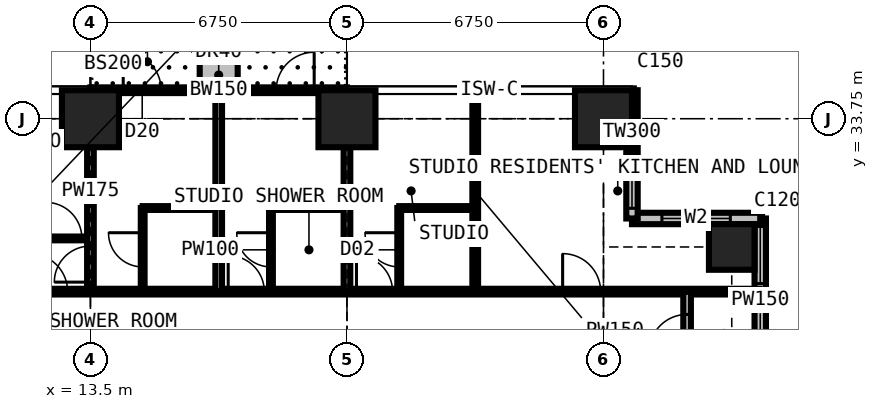
"""IFC4 building model, lengths in metres.
Left out: names, types, materials, properties, quantities, classifications, styles, units other than length and angle.
Written with IfcOpenShell. Run it as: python <this file> out.ifc"""

import sys

from ifc_helpers import new_model, si_unit, direction, frame, frame_2d, origin, origin_2d, place, context, subcontext, project, spatial, rectangle, extrude, element, fill, save


model = new_model("IFC4")
c1 = context("Model", 3, precision=1e-05, world=origin(), true_north=direction((0.0, 1.0)))
c2 = subcontext(c1, "Body", "Model", "MODEL_VIEW")
j1 = project(units=[si_unit("LENGTHUNIT", "METRE"), si_unit("PLANEANGLEUNIT", "RADIAN")], contexts=[c1])
p1 = place(None, origin())
s1 = spatial("IfcSite", under=j1, at=p1, CompositionType="ELEMENT")
p2 = place(p1, origin())
s2 = spatial("IfcBuilding", under=s1, at=p2, CompositionType="ELEMENT")
p3 = place(p2, frame((0.0, 0.0, 156.6)))
s3 = spatial("IfcBuildingStorey", under=s2, at=p3, CompositionType="ELEMENT", Elevation=156.6)
for number, where, z_axis, x_axis in (
    (1, (13.5, 33.75, 0.0), (0.0, 0.0, 1.0), (1.0, 0.0, 0.0)),
    (2, (20.25, 33.75, 0.0), (0.0, 0.0, 1.0), (1.0, 0.0, 0.0)),
    (3, (27.0, 33.75, 0.0), (0.0, 0.0, 1.0), (1.0, 0.0, 0.0)),
):
    element("IfcColumn", number, at=place(p3, frame(where, z_axis=z_axis, x_axis=x_axis)), inside=s3, PredefinedType="COLUMN", context=c2, shape_type="SweptSolid", body=[
        extrude(rectangle(XDim=1.5, YDim=1.5, at=origin_2d()), origin(), (0.0, 0.0, 1.0), 3.6),
    ])
p4 = place(p3, frame((30.375, 30.375, 0.0), z_axis=(0.0, 0.0, 1.0), x_axis=(1.0, 0.0, 0.0)))
e4 = element("IfcColumn", 4, at=p4, inside=s3, PredefinedType="COLUMN", context=c2, shape_type="SweptSolid", body=[
    extrude(rectangle(XDim=1.2, YDim=1.2, at=origin_2d()), origin(), (0.0, 0.0, 1.0), 3.6),
])
p5 = place(p3, frame((31.125, 27.75, 0.0), z_axis=(0.0, 0.0, 1.0), x_axis=(0.0, 1.0, 0.0)))
e5 = element("IfcWall", 5, at=p5, inside=s3, PredefinedType="SOLIDWALL", context=c2, shape_type="SweptSolid", body=[
    extrude(rectangle(XDim=3.375, YDim=0.3, at=frame_2d((1.688, 0.0))), origin(), (0.0, 0.0, 1.0), 3.375),
])
p6 = place(p5, frame((1.663, 0.0, 0.9)))
e6 = element("IfcOpeningElement", 6, at=p6, cuts=e5, PredefinedType="OPENING", context=c2, shape_type="SweptSolid", body=[
    extrude(rectangle(XDim=1.5, YDim=1.8, at=frame_2d((0.75, 0.9))), frame((0.0, 0.16, 0.0), z_axis=(0.0, -1.0, 0.0), x_axis=(1.0, 0.0, 0.0)), (0.0, 0.0, 1.0), 0.32),
])
p7 = place(p3, frame((31.125, 31.125, 0.0), z_axis=(0.0, 0.0, 1.0), x_axis=(-1.0, 0.0, 0.0)))
e7 = element("IfcWall", 7, at=p7, inside=s3, PredefinedType="SOLIDWALL", context=c2, shape_type="SweptSolid", body=[
    extrude(rectangle(XDim=3.375, YDim=0.3, at=frame_2d((1.688, 0.0))), origin(), (0.0, 0.0, 1.0), 3.375),
])
p8 = place(p7, frame((0.788, 0.0, 0.6)))
e8 = element("IfcOpeningElement", 8, at=p8, cuts=e7, PredefinedType="OPENING", context=c2, shape_type="SweptSolid", body=[
    extrude(rectangle(XDim=1.8, YDim=2.1, at=frame_2d((0.9, 1.05))), frame((0.0, 0.16, 0.0), z_axis=(0.0, -1.0, 0.0), x_axis=(1.0, 0.0, 0.0)), (0.0, 0.0, 1.0), 0.32),
])
p9 = place(p3, frame((27.75, 31.125, 0.0), z_axis=(0.0, 0.0, 1.0), x_axis=(0.0, 1.0, 0.0)))
e9 = element("IfcWall", 9, at=p9, inside=s3, PredefinedType="SOLIDWALL", context=c2, shape_type="SweptSolid", body=[
    extrude(rectangle(XDim=3.375, YDim=0.3, at=frame_2d((1.688, 0.0))), origin(), (0.0, 0.0, 1.0), 3.375),
])
p10 = place(p9, frame((0.268, 0.0, 0.9)))
e10 = element("IfcOpeningElement", 10, at=p10, cuts=e9, PredefinedType="OPENING", context=c2, shape_type="SweptSolid", body=[
    extrude(rectangle(XDim=1.5, YDim=1.8, at=frame_2d((0.75, 0.9))), frame((0.0, 0.16, 0.0), z_axis=(0.0, -1.0, 0.0), x_axis=(1.0, 0.0, 0.0)), (0.0, 0.0, 1.0), 0.32),
])
p11 = place(p3, frame((13.5, 34.5, 0.0), z_axis=(0.0, 0.0, 1.0), x_axis=(1.0, 0.0, 0.0)))
e11 = element("IfcWall", 11, at=p11, inside=s3, PredefinedType="SOLIDWALL", context=c2, shape_type="SweptSolid", body=[
    extrude(rectangle(XDim=6.75, YDim=0.15, at=frame_2d((3.375, 0.0))), origin(), (0.0, 0.0, 1.0), 3.375),
])
p12 = place(p11, frame((0.863, 0.0, 0.0)))
e12 = element("IfcOpeningElement", 12, at=p12, cuts=e11, PredefinedType="OPENING", context=c2, shape_type="SweptSolid", body=[
    extrude(rectangle(XDim=1.0, YDim=2.2, at=frame_2d((0.5, 1.1))), frame((0.0, 0.085, 0.0), z_axis=(0.0, -1.0, 0.0), x_axis=(1.0, 0.0, 0.0)), (0.0, 0.0, 1.0), 0.17),
])
p13 = place(p11, frame((1.975, 0.0, 0.9)))
e13 = element("IfcOpeningElement", 13, at=p13, cuts=e11, PredefinedType="OPENING", context=c2, shape_type="SweptSolid", body=[
    extrude(rectangle(XDim=1.2, YDim=1.8, at=frame_2d((0.6, 0.9))), frame((0.0, 0.085, 0.0), z_axis=(0.0, -1.0, 0.0), x_axis=(1.0, 0.0, 0.0)), (0.0, 0.0, 1.0), 0.17),
])
p14 = place(p11, frame((4.887, 0.0, 0.0)))
e14 = element("IfcOpeningElement", 14, at=p14, cuts=e11, PredefinedType="OPENING", context=c2, shape_type="SweptSolid", body=[
    extrude(rectangle(XDim=1.0, YDim=2.2, at=frame_2d((0.5, 1.1))), frame((0.0, 0.085, 0.0), z_axis=(0.0, -1.0, 0.0), x_axis=(1.0, 0.0, 0.0)), (0.0, 0.0, 1.0), 0.17),
])
p15 = place(p11, frame((3.575, 0.0, 0.9)))
e15 = element("IfcOpeningElement", 15, at=p15, cuts=e11, PredefinedType="OPENING", context=c2, shape_type="SweptSolid", body=[
    extrude(rectangle(XDim=1.2, YDim=1.8, at=frame_2d((0.6, 0.9))), frame((0.0, 0.085, 0.0), z_axis=(0.0, -1.0, 0.0), x_axis=(1.0, 0.0, 0.0)), (0.0, 0.0, 1.0), 0.17),
])
p16 = place(p3, frame((16.875, 34.6, 0.0), z_axis=(0.0, 0.0, 1.0), x_axis=(0.0, 1.0, 0.0)))
e16 = element("IfcWall", 16, at=p16, inside=s3, PredefinedType="USERDEFINED", context=c2, shape_type="SweptSolid", body=[
    extrude(rectangle(XDim=2.2, YDim=1.0, at=frame_2d((1.1, 0.0))), origin(), (0.0, 0.0, 1.0), 0.9),
])
p17 = place(p3, frame((10.125, 30.6, 0.0), z_axis=(0.0, 0.0, 1.0), x_axis=(1.0, 0.0, 0.0)))
e17 = element("IfcWall", 17, at=p17, inside=s3, PredefinedType="PARTITIONING", context=c2, shape_type="SweptSolid", body=[
    extrude(rectangle(XDim=3.375, YDim=0.1, at=frame_2d((1.688, 0.0))), origin(), (0.0, 0.0, 1.0), 3.375),
])
p18 = place(p17, frame((2.2, 0.0, 0.0)))
e18 = element("IfcOpeningElement", 18, at=p18, cuts=e17, PredefinedType="OPENING", context=c2, shape_type="SweptSolid", body=[
    extrude(rectangle(XDim=0.95, YDim=2.2, at=frame_2d((0.475, 1.1))), frame((0.0, 0.06, 0.0), z_axis=(0.0, -1.0, 0.0), x_axis=(1.0, 0.0, 0.0)), (0.0, 0.0, 1.0), 0.12),
])
p19 = place(p3, frame((11.3, 29.2, 0.0), z_axis=(0.0, 0.0, 1.0), x_axis=(1.0, 0.0, 0.0)))
e19 = element("IfcWall", 19, at=p19, inside=s3, PredefinedType="PARTITIONING", context=c2, shape_type="SweptSolid", body=[
    extrude(rectangle(XDim=19.809, YDim=0.15, at=frame_2d((9.904, 0.0))), origin(), (0.0, 0.0, 1.0), 3.375),
])
p20 = place(p19, frame((14.625, 0.0, 0.0)))
e20 = element("IfcOpeningElement", 20, at=p20, cuts=e19, PredefinedType="OPENING", context=c2, shape_type="SweptSolid", body=[
    extrude(rectangle(XDim=1.0, YDim=2.2, at=frame_2d((0.5, 1.1))), frame((0.0, 0.085, 0.0), z_axis=(0.0, -1.0, 0.0), x_axis=(1.0, 0.0, 0.0)), (0.0, 0.0, 1.0), 0.17),
])
p21 = place(p19, frame((5.825, 0.0, 0.0)))
e21 = element("IfcOpeningElement", 21, at=p21, cuts=e19, PredefinedType="OPENING", context=c2, shape_type="SweptSolid", body=[
    extrude(rectangle(XDim=0.95, YDim=2.2, at=frame_2d((0.475, 1.1))), frame((0.0, 0.085, 0.0), z_axis=(0.0, -1.0, 0.0), x_axis=(1.0, 0.0, 0.0)), (0.0, 0.0, 1.0), 0.17),
])
p22 = place(p19, frame((9.2, 0.0, 0.0)))
e22 = element("IfcOpeningElement", 22, at=p22, cuts=e19, PredefinedType="OPENING", context=c2, shape_type="SweptSolid", body=[
    extrude(rectangle(XDim=0.95, YDim=2.2, at=frame_2d((0.475, 1.1))), frame((0.0, 0.085, 0.0), z_axis=(0.0, -1.0, 0.0), x_axis=(1.0, 0.0, 0.0)), (0.0, 0.0, 1.0), 0.17),
])
p23 = place(p19, frame((0.6, 0.0, 0.0)))
e23 = element("IfcOpeningElement", 23, at=p23, cuts=e19, PredefinedType="OPENING", context=c2, shape_type="SweptSolid", body=[
    extrude(rectangle(XDim=1.0, YDim=2.2, at=frame_2d((0.5, 1.1))), frame((0.0, 0.085, 0.0), z_axis=(0.0, -1.0, 0.0), x_axis=(1.0, 0.0, 0.0)), (0.0, 0.0, 1.0), 0.17),
])
p24 = place(p3, frame((13.5, 29.2, 0.0), z_axis=(0.0, 0.0, 1.0), x_axis=(0.0, 1.0, 0.0)))
e24 = element("IfcWall", 24, at=p24, inside=s3, PredefinedType="PARTITIONING", context=c2, shape_type="SweptSolid", body=[
    extrude(rectangle(XDim=5.284, YDim=0.175, at=frame_2d((2.642, 0.0))), origin(), (0.0, 0.0, 1.0), 2.806),
])
p25 = place(p24, frame((0.25, 0.0, 0.0)))
e25 = element("IfcOpeningElement", 25, at=p25, cuts=e24, PredefinedType="OPENING", context=c2, shape_type="SweptSolid", body=[
    extrude(rectangle(XDim=0.95, YDim=2.2, at=frame_2d((0.475, 1.1))), frame((0.0, 0.097, 0.0), z_axis=(0.0, -1.0, 0.0), x_axis=(1.0, 0.0, 0.0)), (0.0, 0.0, 1.0), 0.195),
])
p26 = place(p3, frame((14.875, 29.2, 0.0), z_axis=(0.0, 0.0, 1.0), x_axis=(0.0, 1.0, 0.0)))
e26 = element("IfcWall", 26, at=p26, inside=s3, PredefinedType="PARTITIONING", context=c2, shape_type="SweptSolid", body=[
    extrude(rectangle(XDim=2.2, YDim=0.1, at=frame_2d((1.1, 0.0))), origin(), (0.0, 0.0, 1.0), 3.375),
])
p27 = place(p26, frame((0.65, 0.0, 0.0)))
e27 = element("IfcOpeningElement", 27, at=p27, cuts=e26, PredefinedType="OPENING", context=c2, shape_type="SweptSolid", body=[
    extrude(rectangle(XDim=0.9, YDim=2.2, at=frame_2d((0.45, 1.1))), frame((0.0, 0.06, 0.0), z_axis=(0.0, -1.0, 0.0), x_axis=(1.0, 0.0, 0.0)), (0.0, 0.0, 1.0), 0.12),
])
p28 = place(p3, frame((14.875, 31.4, 0.0), z_axis=(0.0, 0.0, 1.0), x_axis=(1.0, 0.0, 0.0)))
e28 = element("IfcWall", 28, at=p28, inside=s3, PredefinedType="PARTITIONING", context=c2, shape_type="SweptSolid", body=[
    extrude(rectangle(XDim=2.0, YDim=0.1, at=frame_2d((1.0, 0.0))), origin(), (0.0, 0.0, 1.0), 3.375),
])
p29 = place(p3, frame((16.875, 29.2, 0.0), z_axis=(0.0, 0.0, 1.0), x_axis=(0.0, 1.0, 0.0)))
e29 = element("IfcWall", 29, at=p29, inside=s3, PredefinedType="PARTITIONING", context=c2, shape_type="SweptSolid", body=[
    extrude(rectangle(XDim=5.284, YDim=0.175, at=frame_2d((2.642, 0.0))), origin(), (0.0, 0.0, 1.0), 3.375),
])
p30 = place(p3, frame((18.25, 29.2, 0.0), z_axis=(0.0, 0.0, 1.0), x_axis=(0.0, 1.0, 0.0)))
e30 = element("IfcWall", 30, at=p30, inside=s3, PredefinedType="PARTITIONING", context=c2, shape_type="SweptSolid", body=[
    extrude(rectangle(XDim=2.2, YDim=0.1, at=frame_2d((1.1, 0.0))), origin(), (0.0, 0.0, 1.0), 3.375),
])
p31 = place(p30, frame((0.65, 0.0, 0.0)))
e31 = element("IfcOpeningElement", 31, at=p31, cuts=e30, PredefinedType="OPENING", context=c2, shape_type="SweptSolid", body=[
    extrude(rectangle(XDim=0.9, YDim=2.2, at=frame_2d((0.45, 1.1))), frame((0.0, 0.06, 0.0), z_axis=(0.0, -1.0, 0.0), x_axis=(1.0, 0.0, 0.0)), (0.0, 0.0, 1.0), 0.12),
])
p32 = place(p3, frame((18.25, 31.4, 0.0), z_axis=(0.0, 0.0, 1.0), x_axis=(1.0, 0.0, 0.0)))
e32 = element("IfcWall", 32, at=p32, inside=s3, PredefinedType="PARTITIONING", context=c2, shape_type="SweptSolid", body=[
    extrude(rectangle(XDim=2.0, YDim=0.1, at=frame_2d((1.0, 0.0))), origin(), (0.0, 0.0, 1.0), 3.375),
])
p33 = place(p3, frame((20.25, 29.2, 0.0), z_axis=(0.0, 0.0, 1.0), x_axis=(0.0, 1.0, 0.0)))
e33 = element("IfcWall", 33, at=p33, inside=s3, PredefinedType="PARTITIONING", context=c2, shape_type="SweptSolid", body=[
    extrude(rectangle(XDim=5.284, YDim=0.175, at=frame_2d((2.642, 0.0))), origin(), (0.0, 0.0, 1.0), 2.806),
])
p34 = place(p3, frame((21.625, 29.2, 0.0), z_axis=(0.0, 0.0, 1.0), x_axis=(0.0, 1.0, 0.0)))
e34 = element("IfcWall", 34, at=p34, inside=s3, PredefinedType="PARTITIONING", context=c2, shape_type="SweptSolid", body=[
    extrude(rectangle(XDim=2.2, YDim=0.1, at=frame_2d((1.1, 0.0))), origin(), (0.0, 0.0, 1.0), 3.375),
])
p35 = place(p34, frame((0.65, 0.0, 0.0)))
e35 = element("IfcOpeningElement", 35, at=p35, cuts=e34, PredefinedType="OPENING", context=c2, shape_type="SweptSolid", body=[
    extrude(rectangle(XDim=0.9, YDim=2.2, at=frame_2d((0.45, 1.1))), frame((0.0, 0.06, 0.0), z_axis=(0.0, -1.0, 0.0), x_axis=(1.0, 0.0, 0.0)), (0.0, 0.0, 1.0), 0.12),
])
p36 = place(p3, frame((21.625, 31.4, 0.0), z_axis=(0.0, 0.0, 1.0), x_axis=(1.0, 0.0, 0.0)))
e36 = element("IfcWall", 36, at=p36, inside=s3, PredefinedType="PARTITIONING", context=c2, shape_type="SweptSolid", body=[
    extrude(rectangle(XDim=2.0, YDim=0.1, at=frame_2d((1.0, 0.0))), origin(), (0.0, 0.0, 1.0), 3.375),
])
p37 = place(p3, frame((23.625, 29.2, 0.0), z_axis=(0.0, 0.0, 1.0), x_axis=(0.0, 1.0, 0.0)))
e37 = element("IfcWall", 37, at=p37, inside=s3, PredefinedType="PARTITIONING", context=c2, shape_type="SweptSolid", body=[
    extrude(rectangle(XDim=5.284, YDim=0.15, at=frame_2d((2.642, 0.0))), origin(), (0.0, 0.0, 1.0), 3.375),
])
p38 = place(p3, frame((29.2, 13.5, 0.0), z_axis=(0.0, 0.0, 1.0), x_axis=(0.0, 1.0, 0.0)))
e38 = element("IfcWall", 38, at=p38, inside=s3, PredefinedType="PARTITIONING", context=c2, shape_type="SweptSolid", body=[
    extrude(rectangle(XDim=15.7, YDim=0.2, at=frame_2d((7.85, 0.0))), origin(), (0.0, 0.0, 1.0), 3.375),
])
p39 = place(p38, frame((3.625, 0.0, 0.0)))
e39 = element("IfcOpeningElement", 39, at=p39, cuts=e38, PredefinedType="OPENING", context=c2, shape_type="SweptSolid", body=[
    extrude(rectangle(XDim=0.95, YDim=2.2, at=frame_2d((0.475, 1.1))), frame((0.0, 0.11, 0.0), z_axis=(0.0, -1.0, 0.0), x_axis=(1.0, 0.0, 0.0)), (0.0, 0.0, 1.0), 0.22),
])
p40 = place(p38, frame((7.0, 0.0, 0.0)))
e40 = element("IfcOpeningElement", 40, at=p40, cuts=e38, PredefinedType="OPENING", context=c2, shape_type="SweptSolid", body=[
    extrude(rectangle(XDim=0.95, YDim=2.2, at=frame_2d((0.475, 1.1))), frame((0.0, 0.11, 0.0), z_axis=(0.0, -1.0, 0.0), x_axis=(1.0, 0.0, 0.0)), (0.0, 0.0, 1.0), 0.22),
])
p41 = place(p38, frame((10.375, 0.0, 0.0)))
e41 = element("IfcOpeningElement", 41, at=p41, cuts=e38, PredefinedType="OPENING", context=c2, shape_type="SweptSolid", body=[
    extrude(rectangle(XDim=0.95, YDim=2.2, at=frame_2d((0.475, 1.1))), frame((0.0, 0.11, 0.0), z_axis=(0.0, -1.0, 0.0), x_axis=(1.0, 0.0, 0.0)), (0.0, 0.0, 1.0), 0.22),
])
p42 = place(p38, frame((14.1, 0.0, 0.0)))
e42 = element("IfcOpeningElement", 42, at=p42, cuts=e38, PredefinedType="OPENING", context=c2, shape_type="SweptSolid", body=[
    extrude(rectangle(XDim=1.0, YDim=2.2, at=frame_2d((0.5, 1.1))), frame((0.0, 0.11, 0.0), z_axis=(0.0, -1.0, 0.0), x_axis=(1.0, 0.0, 0.0)), (0.0, 0.0, 1.0), 0.22),
])
p43 = place(p6, origin())
e43 = element("IfcWindow", 43, at=p43, inside=s3, PartitioningType="SINGLE_PANEL", PredefinedType="WINDOW", context=c2, shape_type="SweptSolid", body=[
    extrude(rectangle(XDim=1.5, YDim=1.8, at=frame_2d((0.75, 0.9))), frame((0.0, 0.03, 0.0), z_axis=(0.0, -1.0, 0.0), x_axis=(1.0, 0.0, 0.0)), (0.0, 0.0, 1.0), 0.06),
])
fill(e6, e43)
p44 = place(p8, origin())
e44 = element("IfcWindow", 44, at=p44, inside=s3, PartitioningType="SINGLE_PANEL", PredefinedType="WINDOW", context=c2, shape_type="SweptSolid", body=[
    extrude(rectangle(XDim=1.8, YDim=2.1, at=frame_2d((0.9, 1.05))), frame((0.0, 0.03, 0.0), z_axis=(0.0, -1.0, 0.0), x_axis=(1.0, 0.0, 0.0)), (0.0, 0.0, 1.0), 0.06),
])
fill(e8, e44)
p45 = place(p10, origin())
e45 = element("IfcWindow", 45, at=p45, inside=s3, PartitioningType="SINGLE_PANEL", PredefinedType="WINDOW", context=c2, shape_type="SweptSolid", body=[
    extrude(rectangle(XDim=1.5, YDim=1.8, at=frame_2d((0.75, 0.9))), frame((0.0, 0.03, 0.0), z_axis=(0.0, -1.0, 0.0), x_axis=(1.0, 0.0, 0.0)), (0.0, 0.0, 1.0), 0.06),
])
fill(e10, e45)
p46 = place(p12, origin())
e46 = element("IfcDoor", 46, at=p46, inside=s3, OperationType="SINGLE_SWING_LEFT", PredefinedType="DOOR", context=c2, shape_type="SweptSolid", body=[
    extrude(rectangle(XDim=1.0, YDim=2.2, at=frame_2d((0.5, 1.1))), frame((0.0, 0.025, 0.0), z_axis=(0.0, -1.0, 0.0), x_axis=(1.0, 0.0, 0.0)), (0.0, 0.0, 1.0), 0.05),
])
fill(e12, e46)
p47 = place(p13, origin())
e47 = element("IfcWindow", 47, at=p47, inside=s3, PartitioningType="SINGLE_PANEL", PredefinedType="WINDOW", context=c2, shape_type="SweptSolid", body=[
    extrude(rectangle(XDim=1.2, YDim=1.8, at=frame_2d((0.6, 0.9))), frame((0.0, 0.03, 0.0), z_axis=(0.0, -1.0, 0.0), x_axis=(1.0, 0.0, 0.0)), (0.0, 0.0, 1.0), 0.06),
])
fill(e13, e47)
p48 = place(p14, origin())
e48 = element("IfcDoor", 48, at=p48, inside=s3, OperationType="SINGLE_SWING_RIGHT", PredefinedType="DOOR", context=c2, shape_type="SweptSolid", body=[
    extrude(rectangle(XDim=1.0, YDim=2.2, at=frame_2d((0.5, 1.1))), frame((0.0, 0.025, 0.0), z_axis=(0.0, -1.0, 0.0), x_axis=(1.0, 0.0, 0.0)), (0.0, 0.0, 1.0), 0.05),
])
fill(e14, e48)
p49 = place(p15, origin())
e49 = element("IfcWindow", 49, at=p49, inside=s3, PartitioningType="SINGLE_PANEL", PredefinedType="WINDOW", context=c2, shape_type="SweptSolid", body=[
    extrude(rectangle(XDim=1.2, YDim=1.8, at=frame_2d((0.6, 0.9))), frame((0.0, 0.03, 0.0), z_axis=(0.0, -1.0, 0.0), x_axis=(1.0, 0.0, 0.0)), (0.0, 0.0, 1.0), 0.06),
])
fill(e15, e49)
p50 = place(p42, origin())
e50 = element("IfcDoor", 50, at=p50, inside=s3, OperationType="SINGLE_SWING_LEFT", PredefinedType="DOOR", context=c2, shape_type="SweptSolid", body=[
    extrude(rectangle(XDim=1.0, YDim=2.2, at=frame_2d((0.5, 1.1))), frame((0.0, 0.025, 0.0), z_axis=(0.0, -1.0, 0.0), x_axis=(1.0, 0.0, 0.0)), (0.0, 0.0, 1.0), 0.05),
])
fill(e42, e50)
p51 = place(p20, origin())
e51 = element("IfcDoor", 51, at=p51, inside=s3, OperationType="SINGLE_SWING_LEFT", PredefinedType="DOOR", context=c2, shape_type="SweptSolid", body=[
    extrude(rectangle(XDim=1.0, YDim=2.2, at=frame_2d((0.5, 1.1))), frame((0.0, 0.025, 0.0), z_axis=(0.0, -1.0, 0.0), x_axis=(1.0, 0.0, 0.0)), (0.0, 0.0, 1.0), 0.05),
])
fill(e20, e51)
p52 = place(p18, origin())
e52 = element("IfcDoor", 52, at=p52, inside=s3, OperationType="SINGLE_SWING_LEFT", PredefinedType="DOOR", context=c2, shape_type="SweptSolid", body=[
    extrude(rectangle(XDim=0.95, YDim=2.2, at=frame_2d((0.475, 1.1))), frame((0.0, 0.025, 0.0), z_axis=(0.0, -1.0, 0.0), x_axis=(1.0, 0.0, 0.0)), (0.0, 0.0, 1.0), 0.05),
])
fill(e18, e52)
p53 = place(p25, origin())
e53 = element("IfcDoor", 53, at=p53, inside=s3, OperationType="SINGLE_SWING_LEFT", PredefinedType="DOOR", context=c2, shape_type="SweptSolid", body=[
    extrude(rectangle(XDim=0.95, YDim=2.2, at=frame_2d((0.475, 1.1))), frame((0.0, 0.025, 0.0), z_axis=(0.0, -1.0, 0.0), x_axis=(1.0, 0.0, 0.0)), (0.0, 0.0, 1.0), 0.05),
])
fill(e25, e53)
p54 = place(p27, origin())
e54 = element("IfcDoor", 54, at=p54, inside=s3, OperationType="SINGLE_SWING_RIGHT", PredefinedType="DOOR", context=c2, shape_type="SweptSolid", body=[
    extrude(rectangle(XDim=0.9, YDim=2.2, at=frame_2d((0.45, 1.1))), frame((0.0, 0.025, 0.0), z_axis=(0.0, -1.0, 0.0), x_axis=(1.0, 0.0, 0.0)), (0.0, 0.0, 1.0), 0.05),
])
fill(e27, e54)
p55 = place(p21, origin())
e55 = element("IfcDoor", 55, at=p55, inside=s3, OperationType="SINGLE_SWING_LEFT", PredefinedType="DOOR", context=c2, shape_type="SweptSolid", body=[
    extrude(rectangle(XDim=0.95, YDim=2.2, at=frame_2d((0.475, 1.1))), frame((0.0, 0.025, 0.0), z_axis=(0.0, -1.0, 0.0), x_axis=(1.0, 0.0, 0.0)), (0.0, 0.0, 1.0), 0.05),
])
fill(e21, e55)
p56 = place(p31, origin())
e56 = element("IfcDoor", 56, at=p56, inside=s3, OperationType="SINGLE_SWING_RIGHT", PredefinedType="DOOR", context=c2, shape_type="SweptSolid", body=[
    extrude(rectangle(XDim=0.9, YDim=2.2, at=frame_2d((0.45, 1.1))), frame((0.0, 0.025, 0.0), z_axis=(0.0, -1.0, 0.0), x_axis=(1.0, 0.0, 0.0)), (0.0, 0.0, 1.0), 0.05),
])
fill(e31, e56)
p57 = place(p22, origin())
e57 = element("IfcDoor", 57, at=p57, inside=s3, OperationType="SINGLE_SWING_LEFT", PredefinedType="DOOR", context=c2, shape_type="SweptSolid", body=[
    extrude(rectangle(XDim=0.95, YDim=2.2, at=frame_2d((0.475, 1.1))), frame((0.0, 0.025, 0.0), z_axis=(0.0, -1.0, 0.0), x_axis=(1.0, 0.0, 0.0)), (0.0, 0.0, 1.0), 0.05),
])
fill(e22, e57)
p58 = place(p35, origin())
e58 = element("IfcDoor", 58, at=p58, inside=s3, OperationType="SINGLE_SWING_RIGHT", PredefinedType="DOOR", context=c2, shape_type="SweptSolid", body=[
    extrude(rectangle(XDim=0.9, YDim=2.2, at=frame_2d((0.45, 1.1))), frame((0.0, 0.025, 0.0), z_axis=(0.0, -1.0, 0.0), x_axis=(1.0, 0.0, 0.0)), (0.0, 0.0, 1.0), 0.05),
])
fill(e35, e58)
p59 = place(p23, origin())
e59 = element("IfcDoor", 59, at=p59, inside=s3, OperationType="SINGLE_SWING_LEFT", PredefinedType="DOOR", context=c2, shape_type="SweptSolid", body=[
    extrude(rectangle(XDim=1.0, YDim=2.2, at=frame_2d((0.5, 1.1))), frame((0.0, 0.025, 0.0), z_axis=(0.0, -1.0, 0.0), x_axis=(1.0, 0.0, 0.0)), (0.0, 0.0, 1.0), 0.05),
])
fill(e23, e59)
save(model, sys.argv[1])
